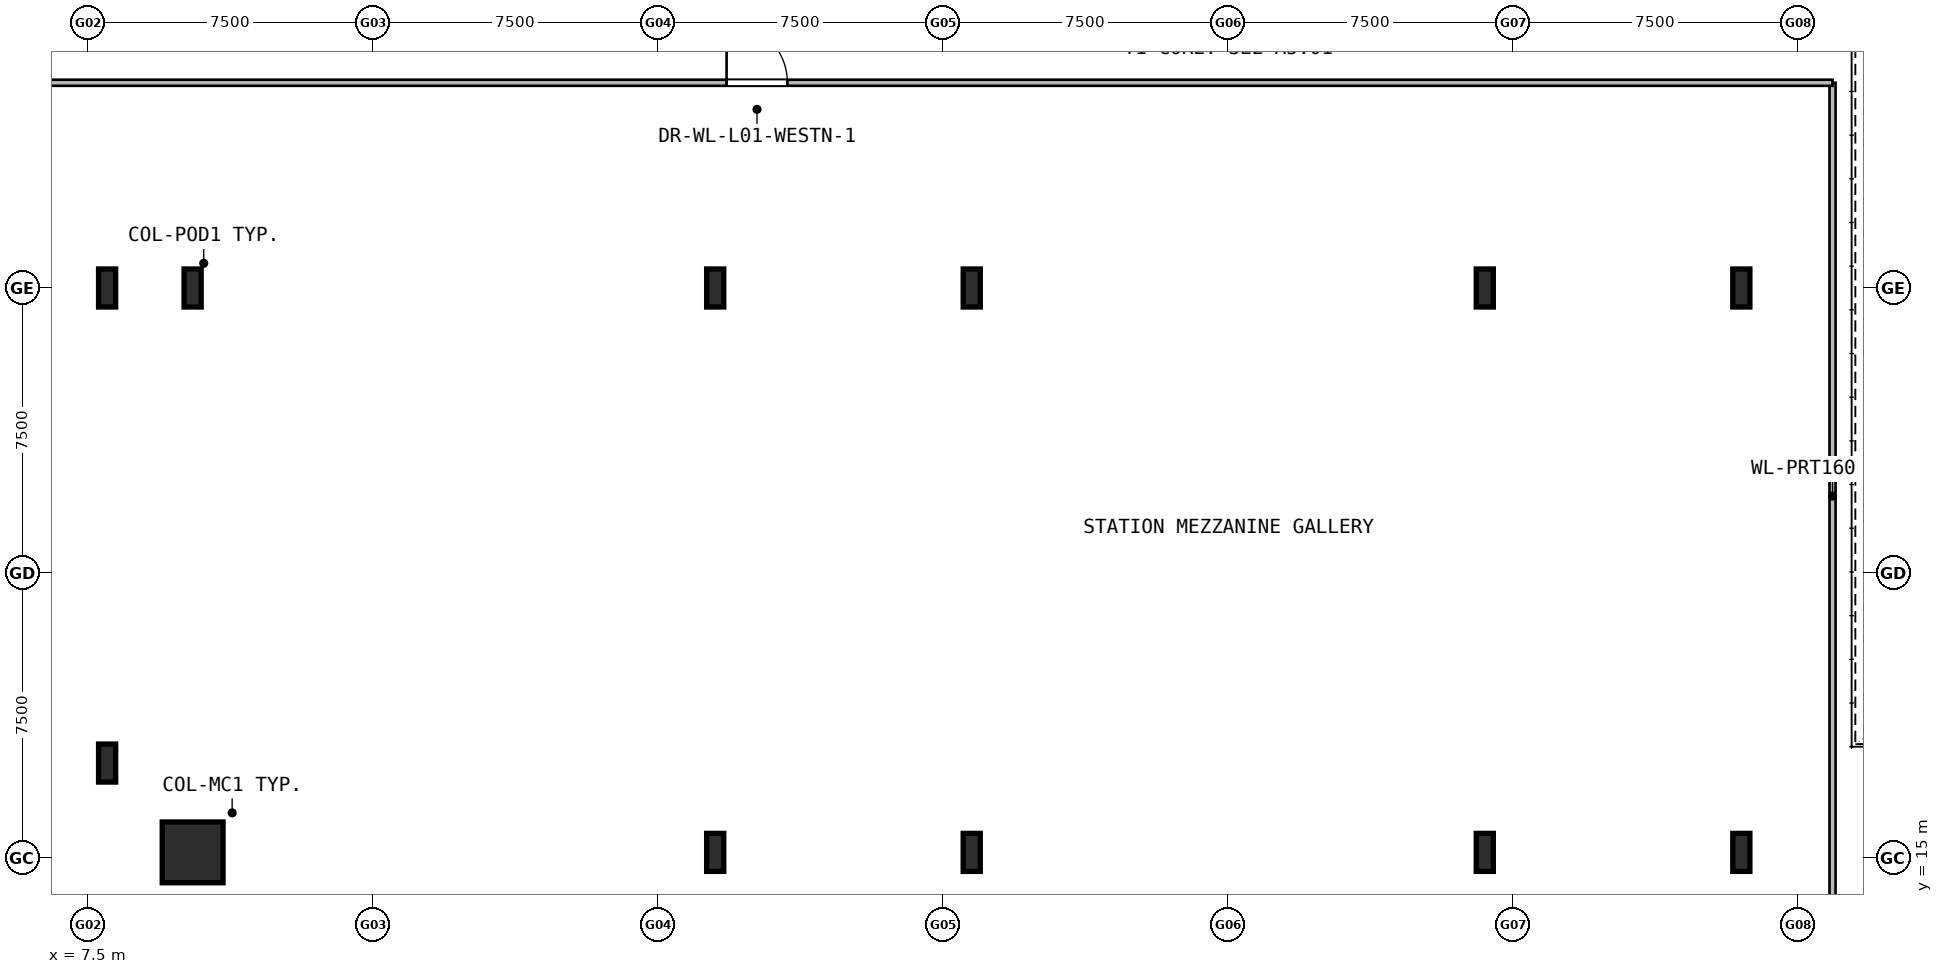
"""IFC4 building model, lengths in metres.
Left out: names, types, materials, properties, quantities, classifications, styles, units other than length and angle.
Written with IfcOpenShell. Run it as: python <this file> out.ifc"""

import sys

from ifc_helpers import new_model, si_unit, direction, frame, frame_2d, origin, origin_2d, place, context, subcontext, project, spatial, rectangle, hollow_rectangle, i_section, extrude, element, fill, save


model = new_model("IFC4")
c1 = context("Model", 3, precision=1e-05, world=origin(), true_north=direction((0.0, 1.0)))
c2 = subcontext(c1, "Body", "Model", "MODEL_VIEW")
j1 = project(units=[si_unit("LENGTHUNIT", "METRE"), si_unit("PLANEANGLEUNIT", "RADIAN")], contexts=[c1])
p1 = place(None, origin())
s1 = spatial("IfcSite", under=j1, at=p1, CompositionType="ELEMENT")
p2 = place(p1, origin())
s2 = spatial("IfcBuilding", under=s1, at=p2, CompositionType="ELEMENT")
p3 = place(p2, frame((0.0, 0.0, 6.0)))
s3 = spatial("IfcBuildingStorey", under=s2, at=p3, CompositionType="ELEMENT", Elevation=6.0)
p4 = place(p3, frame((10.25, 15.15, 0.0), z_axis=(0.0, 0.0, 1.0), x_axis=(1.0, 0.0, 0.0)))
e1 = element("IfcColumn", 1, at=p4, inside=s3, PredefinedType="COLUMN", context=c2, shape_type="SweptSolid", body=[
    extrude(hollow_rectangle(XDim=1.6, YDim=1.6, WallThickness=0.04, at=origin_2d()), origin(), (0.0, 0.0, 1.0), 4.8),
])
for number, where, z_axis, x_axis in (
    (2, (10.25, 30.0, 0.0), (0.0, 0.0, 1.0), (1.0, 0.0, 0.0)),
    (3, (24.0, 15.15, 0.0), (0.0, 0.0, 1.0), (1.0, 0.0, 0.0)),
    (4, (24.0, 30.0, 0.0), (0.0, 0.0, 1.0), (1.0, 0.0, 0.0)),
    (5, (30.75, 15.15, 0.0), (0.0, 0.0, 1.0), (1.0, 0.0, 0.0)),
    (6, (30.75, 30.0, 0.0), (0.0, 0.0, 1.0), (1.0, 0.0, 0.0)),
    (7, (44.25, 15.15, 0.0), (0.0, 0.0, 1.0), (1.0, 0.0, 0.0)),
    (8, (44.25, 30.0, 0.0), (0.0, 0.0, 1.0), (1.0, 0.0, 0.0)),
    (9, (51.0, 15.15, 0.0), (0.0, 0.0, 1.0), (1.0, 0.0, 0.0)),
    (10, (51.0, 30.0, 0.0), (0.0, 0.0, 1.0), (1.0, 0.0, 0.0)),
    (11, (8.0, 17.5, 0.0), (0.0, 0.0, 1.0), (1.0, 0.0, 0.0)),
    (12, (8.0, 30.0, 0.0), (0.0, 0.0, 1.0), (1.0, 0.0, 0.0)),
):
    element("IfcColumn", number, at=place(p3, frame(where, z_axis=z_axis, x_axis=x_axis)), inside=s3, PredefinedType="COLUMN", context=c2, shape_type="SweptSolid", body=[
        extrude(i_section(OverallWidth=0.45, OverallDepth=1.0, WebThickness=0.022, FlangeThickness=0.04, at=origin_2d()), origin(), (0.0, 0.0, 1.0), 4.8),
    ])
p5 = place(p3, frame((53.4, 13.65, 0.0), z_axis=(0.0, 0.0, 1.0), x_axis=(0.0, 1.0, 0.0)))
e13 = element("IfcWall", 13, at=p5, inside=s3, PredefinedType="PARTITIONING", context=c2, shape_type="SweptSolid", body=[
    extrude(rectangle(XDim=21.75, YDim=0.16, at=frame_2d((10.875, 0.0))), origin(), (0.0, 0.0, 1.0), 4.48),
])
p6 = place(p3, frame((6.15, 35.4, 0.0), z_axis=(0.0, 0.0, 1.0), x_axis=(1.0, 0.0, 0.0)))
e14 = element("IfcWall", 14, at=p6, inside=s3, PredefinedType="PARTITIONING", context=c2, shape_type="SweptSolid", body=[
    extrude(rectangle(XDim=47.25, YDim=0.16, at=frame_2d((23.625, 0.0))), origin(), (0.0, 0.0, 1.0), 4.48),
])
p7 = place(p6, frame((18.15, 0.0, 0.0)))
e15 = element("IfcOpeningElement", 15, at=p7, cuts=e14, PredefinedType="OPENING", context=c2, shape_type="SweptSolid", body=[
    extrude(rectangle(XDim=1.6, YDim=2.2, at=frame_2d((0.8, 1.1))), frame((0.0, 0.09, 0.0), z_axis=(0.0, -1.0, 0.0), x_axis=(1.0, 0.0, 0.0)), (0.0, 0.0, 1.0), 0.18),
])
p8 = place(p7, origin())
e16 = element("IfcDoor", 16, at=p8, inside=s3, OperationType="DOUBLE_DOOR_SINGLE_SWING", PredefinedType="DOOR", context=c2, shape_type="SweptSolid", body=[
    extrude(rectangle(XDim=1.6, YDim=2.2, at=frame_2d((0.8, 1.1))), frame((0.0, 0.025, 0.0), z_axis=(0.0, -1.0, 0.0), x_axis=(1.0, 0.0, 0.0)), (0.0, 0.0, 1.0), 0.05),
])
fill(e15, e16)
save(model, sys.argv[1])
